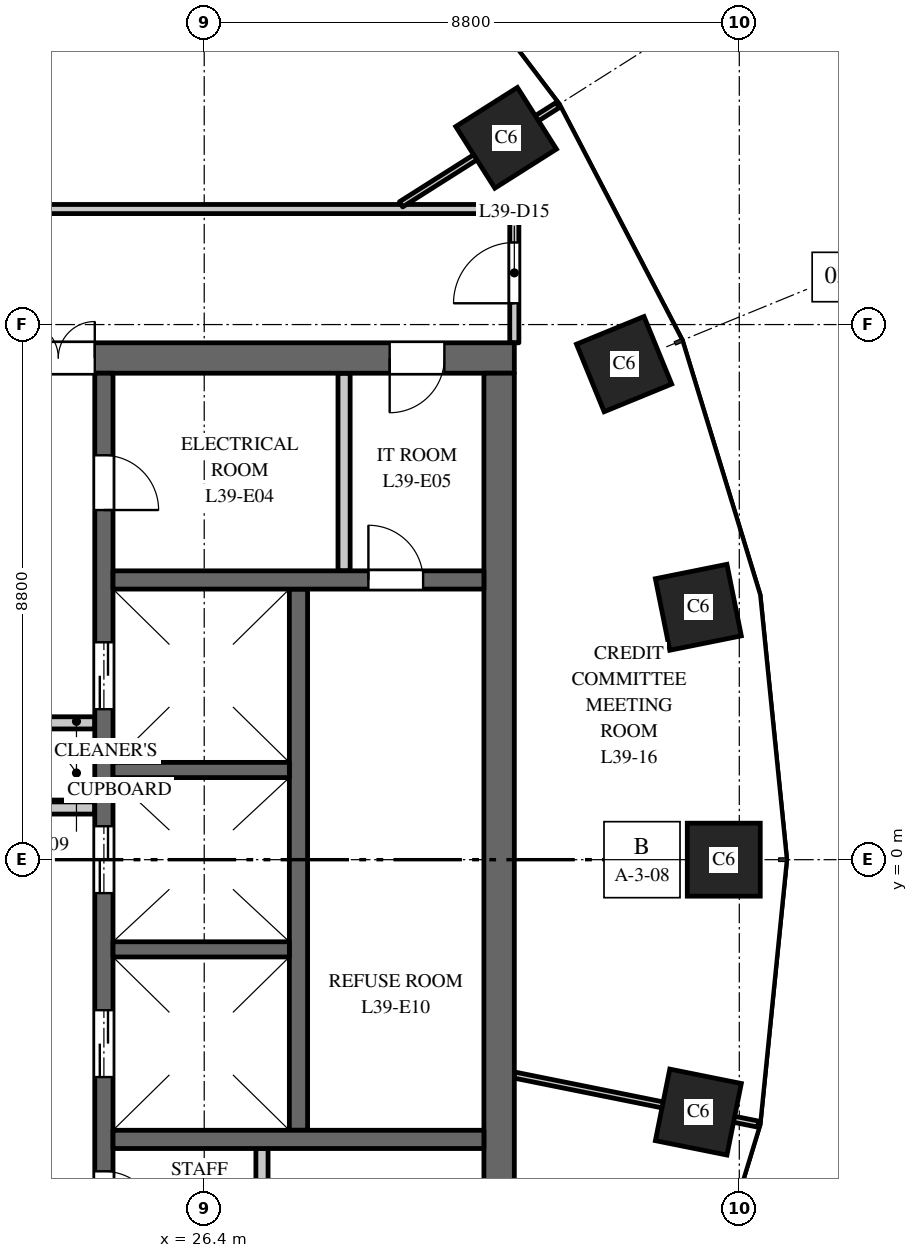
"""IFC4 building model, lengths in metres.
Left out: names, types, materials, properties, quantities, classifications, styles, units other than length and angle.
Written with IfcOpenShell. Run it as: python <this file> out.ifc"""

import sys

from ifc_helpers import new_model, si_unit, direction, frame, frame_2d, origin, origin_2d, place, context, subcontext, project, spatial, rectangle, extrude, element, fill, save


model = new_model("IFC4")
c1 = context("Model", 3, precision=1e-05, world=origin(), true_north=direction((0.0, 1.0)))
c2 = subcontext(c1, "Body", "Model", "MODEL_VIEW")
j1 = project(units=[si_unit("LENGTHUNIT", "METRE"), si_unit("PLANEANGLEUNIT", "RADIAN")], contexts=[c1])
p1 = place(None, origin())
s1 = spatial("IfcSite", under=j1, at=p1, CompositionType="ELEMENT")
p2 = place(p1, origin())
s2 = spatial("IfcBuilding", under=s1, at=p2, CompositionType="ELEMENT")
p3 = place(p2, frame((0.0, 0.0, 170.0)))
s3 = spatial("IfcBuildingStorey", under=s2, at=p3, CompositionType="ELEMENT", Elevation=170.0)
for number, where, z_axis, x_axis in (
    (1, (34.945, 0.0, 0.0), (0.0, 0.0, 1.0), (0.0, 1.0, 0.0)),
    (2, (34.527, 4.151, 0.0), (0.0, 0.0, 1.0), (-0.197, 0.98, 0.0)),
    (3, (33.305, 8.149, 0.0), (0.0, 0.0, 1.0), (-0.379, 0.925, 0.0)),
    (4, (31.365, 11.871, 0.0), (0.0, 0.0, 1.0), (-0.535, 0.845, 0.0)),
    (5, (34.527, -4.151, 0.0), (0.0, 0.0, 1.0), (0.197, 0.98, 0.0)),
):
    element("IfcColumn", number, at=place(p3, frame(where, z_axis=z_axis, x_axis=x_axis)), inside=s3, PredefinedType="COLUMN", context=c2, shape_type="SweptSolid", body=[
        extrude(rectangle(XDim=1.2, YDim=1.2, at=origin_2d()), origin(), (0.0, 0.0, 1.0), 4.0),
    ])
p4 = place(p3, frame((16.5, 8.25, 0.0), z_axis=(0.0, 0.0, 1.0), x_axis=(1.0, 0.0, 0.0)))
e6 = element("IfcWall", 6, at=p4, inside=s3, PredefinedType="SHEAR", context=c2, shape_type="SweptSolid", body=[
    extrude(rectangle(XDim=15.0, YDim=0.5, at=frame_2d((7.5, 0.0))), origin(), (0.0, 0.0, 1.0), 3.7),
])
p5 = place(p4, frame((6.9, 0.0, 0.0)))
e7 = element("IfcOpeningElement", 7, at=p5, cuts=e6, PredefinedType="OPENING", context=c2, shape_type="SweptSolid", body=[
    extrude(rectangle(XDim=1.2, YDim=2.1, at=frame_2d((0.6, 1.05))), frame((0.0, 0.26, 0.0), z_axis=(0.0, -1.0, 0.0), x_axis=(1.0, 0.0, 0.0)), (0.0, 0.0, 1.0), 0.52),
])
p6 = place(p4, frame((12.95, 0.0, 0.0)))
e8 = element("IfcOpeningElement", 8, at=p6, cuts=e6, PredefinedType="OPENING", context=c2, shape_type="SweptSolid", body=[
    extrude(rectangle(XDim=0.9, YDim=2.1, at=frame_2d((0.45, 1.05))), frame((0.0, 0.26, 0.0), z_axis=(0.0, -1.0, 0.0), x_axis=(1.0, 0.0, 0.0)), (0.0, 0.0, 1.0), 0.52),
])
p7 = place(p3, frame((27.95, -4.45, 0.0), z_axis=(0.0, 0.0, 1.0), x_axis=(0.0, 1.0, 0.0)))
e9 = element("IfcWall", 9, at=p7, inside=s3, PredefinedType="SHEAR", context=c2, shape_type="SweptSolid", body=[
    extrude(rectangle(XDim=8.9, YDim=0.3, at=frame_2d((4.45, 0.0))), origin(), (0.0, 0.0, 1.0), 3.7),
])
p8 = place(p3, frame((24.75, -8.0, 0.0), z_axis=(0.0, 0.0, 1.0), x_axis=(0.0, 1.0, 0.0)))
e10 = element("IfcWall", 10, at=p8, inside=s3, PredefinedType="SHEAR", context=c2, shape_type="SweptSolid", body=[
    extrude(rectangle(XDim=16.0, YDim=0.3, at=frame_2d((8.0, 0.0))), origin(), (0.0, 0.0, 1.0), 3.7),
])
p9 = place(p8, frame((4.425, 0.0, 0.0)))
e11 = element("IfcOpeningElement", 11, at=p9, cuts=e10, PredefinedType="OPENING", context=c2, shape_type="SweptSolid", body=[
    extrude(rectangle(XDim=1.1, YDim=2.1, at=frame_2d((0.55, 1.05))), frame((0.0, 0.16, 0.0), z_axis=(0.0, -1.0, 0.0), x_axis=(1.0, 0.0, 0.0)), (0.0, 0.0, 1.0), 0.32),
])
p10 = place(p8, frame((7.45, 0.0, 0.0)))
e12 = element("IfcOpeningElement", 12, at=p10, cuts=e10, PredefinedType="OPENING", context=c2, shape_type="SweptSolid", body=[
    extrude(rectangle(XDim=1.1, YDim=2.1, at=frame_2d((0.55, 1.05))), frame((0.0, 0.16, 0.0), z_axis=(0.0, -1.0, 0.0), x_axis=(1.0, 0.0, 0.0)), (0.0, 0.0, 1.0), 0.32),
])
p11 = place(p8, frame((10.475, 0.0, 0.0)))
e13 = element("IfcOpeningElement", 13, at=p11, cuts=e10, PredefinedType="OPENING", context=c2, shape_type="SweptSolid", body=[
    extrude(rectangle(XDim=1.1, YDim=2.1, at=frame_2d((0.55, 1.05))), frame((0.0, 0.16, 0.0), z_axis=(0.0, -1.0, 0.0), x_axis=(1.0, 0.0, 0.0)), (0.0, 0.0, 1.0), 0.32),
])
p12 = place(p8, frame((13.75, 0.0, 0.0)))
e14 = element("IfcOpeningElement", 14, at=p12, cuts=e10, PredefinedType="OPENING", context=c2, shape_type="SweptSolid", body=[
    extrude(rectangle(XDim=0.9, YDim=2.1, at=frame_2d((0.45, 1.05))), frame((0.0, 0.16, 0.0), z_axis=(0.0, -1.0, 0.0), x_axis=(1.0, 0.0, 0.0)), (0.0, 0.0, 1.0), 0.32),
])
p13 = place(p8, frame((1.975, 0.0, 0.0)))
e15 = element("IfcOpeningElement", 15, at=p13, cuts=e10, PredefinedType="OPENING", context=c2, shape_type="SweptSolid", body=[
    extrude(rectangle(XDim=0.9, YDim=2.1, at=frame_2d((0.45, 1.05))), frame((0.0, 0.16, 0.0), z_axis=(0.0, -1.0, 0.0), x_axis=(1.0, 0.0, 0.0)), (0.0, 0.0, 1.0), 0.32),
])
p14 = place(p8, frame((0.35, 0.0, 0.0)))
e16 = element("IfcOpeningElement", 16, at=p14, cuts=e10, PredefinedType="OPENING", context=c2, shape_type="SweptSolid", body=[
    extrude(rectangle(XDim=0.9, YDim=2.1, at=frame_2d((0.45, 1.05))), frame((0.0, 0.16, 0.0), z_axis=(0.0, -1.0, 0.0), x_axis=(1.0, 0.0, 0.0)), (0.0, 0.0, 1.0), 0.32),
])
for number, where, z_axis, x_axis in (
    (17, (23.4, 0.85, 0.0), (0.0, 0.0, 1.0), (1.0, 0.0, 0.0)),
    (18, (23.4, 2.25, 0.0), (0.0, 0.0, 1.0), (1.0, 0.0, 0.0)),
):
    element("IfcWall", number, at=place(p3, frame(where, z_axis=z_axis, x_axis=x_axis)), inside=s3, PredefinedType="PARTITIONING", context=c2, shape_type="SweptSolid", body=[
        extrude(rectangle(XDim=1.2, YDim=0.2, at=frame_2d((0.6, 0.0))), origin(), (0.0, 0.0, 1.0), 3.7),
    ])
p15 = place(p3, frame((31.25, -8.0, 0.0), z_axis=(0.0, 0.0, 1.0), x_axis=(0.0, 1.0, 0.0)))
e19 = element("IfcWall", 19, at=p15, inside=s3, PredefinedType="SHEAR", context=c2, shape_type="SweptSolid", body=[
    extrude(rectangle(XDim=16.0, YDim=0.5, at=frame_2d((8.0, 0.0))), origin(), (0.0, 0.0, 1.0), 3.7),
])
p16 = place(p3, frame((24.9, 4.6, 0.0), z_axis=(0.0, 0.0, 1.0), x_axis=(1.0, 0.0, 0.0)))
e20 = element("IfcWall", 20, at=p16, inside=s3, PredefinedType="SHEAR", context=c2, shape_type="SweptSolid", body=[
    extrude(rectangle(XDim=6.1, YDim=0.3, at=frame_2d((3.05, 0.0))), origin(), (0.0, 0.0, 1.0), 3.7),
])
p17 = place(p16, frame((4.2, 0.0, 0.0)))
e21 = element("IfcOpeningElement", 21, at=p17, cuts=e20, PredefinedType="OPENING", context=c2, shape_type="SweptSolid", body=[
    extrude(rectangle(XDim=0.9, YDim=2.1, at=frame_2d((0.45, 1.05))), frame((0.0, 0.16, 0.0), z_axis=(0.0, -1.0, 0.0), x_axis=(1.0, 0.0, 0.0)), (0.0, 0.0, 1.0), 0.32),
])
for number, where, z_axis, x_axis in (
    (22, (28.7, 4.75, 0.0), (0.0, 0.0, 1.0), (0.0, 1.0, 0.0)),
    (23, (27.35, -8.0, 0.0), (0.0, 0.0, 1.0), (0.0, 1.0, 0.0)),
):
    element("IfcWall", number, at=place(p3, frame(where, z_axis=z_axis, x_axis=x_axis)), inside=s3, PredefinedType="PARTITIONING", context=c2, shape_type="SweptSolid", body=[
        extrude(rectangle(XDim=3.25, YDim=0.2, at=frame_2d((1.625, 0.0))), origin(), (0.0, 0.0, 1.0), 3.7),
    ])
p18 = place(p3, frame((24.9, -4.6, 0.0), z_axis=(0.0, 0.0, 1.0), x_axis=(1.0, 0.0, 0.0)))
e24 = element("IfcWall", 24, at=p18, inside=s3, PredefinedType="SHEAR", context=c2, shape_type="SweptSolid", body=[
    extrude(rectangle(XDim=6.1, YDim=0.3, at=frame_2d((3.05, 0.0))), origin(), (0.0, 0.0, 1.0), 3.7),
])
for number, where, z_axis, x_axis in (
    (25, (24.9, -1.475, 0.0), (0.0, 0.0, 1.0), (1.0, 0.0, 0.0)),
    (26, (24.9, 1.475, 0.0), (0.0, 0.0, 1.0), (1.0, 0.0, 0.0)),
):
    element("IfcWall", number, at=place(p3, frame(where, z_axis=z_axis, x_axis=x_axis)), inside=s3, PredefinedType="SHEAR", context=c2, shape_type="SweptSolid", body=[
        extrude(rectangle(XDim=2.9, YDim=0.25, at=frame_2d((1.45, 0.0))), origin(), (0.0, 0.0, 1.0), 3.7),
    ])
p19 = place(p3, frame((16.5, 10.7, 0.0), z_axis=(0.0, 0.0, 1.0), x_axis=(1.0, 0.0, 0.0)))
e27 = element("IfcWall", 27, at=p19, inside=s3, PredefinedType="PARTITIONING", context=c2, shape_type="SweptSolid", body=[
    extrude(rectangle(XDim=15.0, YDim=0.15, at=frame_2d((7.5, 0.0))), origin(), (0.0, 0.0, 1.0), 2.75),
])
p20 = place(p19, frame((4.621, 0.0, 0.0)))
e28 = element("IfcOpeningElement", 28, at=p20, cuts=e27, PredefinedType="OPENING", context=c2, shape_type="SweptSolid", body=[
    extrude(rectangle(XDim=1.0, YDim=2.1, at=frame_2d((0.5, 1.05))), frame((0.0, 0.085, 0.0), z_axis=(0.0, -1.0, 0.0), x_axis=(1.0, 0.0, 0.0)), (0.0, 0.0, 1.0), 0.17),
])
p21 = place(p3, frame((29.637, 10.777, 0.0), z_axis=(0.0, 0.0, 1.0), x_axis=(0.844810627195, 0.535065420467, 0.0)))
e29 = element("IfcWall", 29, at=p21, inside=s3, PredefinedType="PARTITIONING", context=c2, shape_type="SweptSolid", body=[
    extrude(rectangle(XDim=3.048, YDim=0.1, at=frame_2d((1.524, 0.0))), origin(), (0.0, 0.0, 1.0), 2.9),
])
p22 = place(p3, frame((31.5, -3.542, 0.0), z_axis=(0.0, 0.0, 1.0), x_axis=(0.980357474535, -0.197228857227, 0.0)))
e30 = element("IfcWall", 30, at=p22, inside=s3, PredefinedType="PARTITIONING", context=c2, shape_type="SweptSolid", body=[
    extrude(rectangle(XDim=4.092, YDim=0.1, at=frame_2d((2.046, 0.0))), origin(), (0.0, 0.0, 1.0), 2.9),
])
p23 = place(p3, frame((31.5, 8.5, 0.0), z_axis=(0.0, 0.0, 1.0), x_axis=(0.0, 1.0, 0.0)))
e31 = element("IfcWall", 31, at=p23, inside=s3, PredefinedType="PARTITIONING", context=c2, shape_type="SweptSolid", body=[
    extrude(rectangle(XDim=2.2, YDim=0.15, at=frame_2d((1.1, 0.0))), origin(), (0.0, 0.0, 1.0), 2.9),
])
p24 = place(p23, frame((0.65, 0.0, 0.0)))
e32 = element("IfcOpeningElement", 32, at=p24, cuts=e31, PredefinedType="OPENING", context=c2, shape_type="SweptSolid", body=[
    extrude(rectangle(XDim=1.0, YDim=2.1, at=frame_2d((0.5, 1.05))), frame((0.0, 0.085, 0.0), z_axis=(0.0, -1.0, 0.0), x_axis=(1.0, 0.0, 0.0)), (0.0, 0.0, 1.0), 0.17),
])
p25 = place(p9, origin())
e33 = element("IfcDoor", 33, at=p25, inside=s3, OperationType="DOUBLE_DOOR_SLIDING", PredefinedType="DOOR", context=c2, shape_type="SweptSolid", body=[
    extrude(rectangle(XDim=1.1, YDim=2.1, at=frame_2d((0.55, 1.05))), frame((0.0, 0.025, 0.0), z_axis=(0.0, -1.0, 0.0), x_axis=(1.0, 0.0, 0.0)), (0.0, 0.0, 1.0), 0.05),
])
fill(e11, e33)
p26 = place(p10, origin())
e34 = element("IfcDoor", 34, at=p26, inside=s3, OperationType="DOUBLE_DOOR_SLIDING", PredefinedType="DOOR", context=c2, shape_type="SweptSolid", body=[
    extrude(rectangle(XDim=1.1, YDim=2.1, at=frame_2d((0.55, 1.05))), frame((0.0, 0.025, 0.0), z_axis=(0.0, -1.0, 0.0), x_axis=(1.0, 0.0, 0.0)), (0.0, 0.0, 1.0), 0.05),
])
fill(e12, e34)
p27 = place(p11, origin())
e35 = element("IfcDoor", 35, at=p27, inside=s3, OperationType="DOUBLE_DOOR_SLIDING", PredefinedType="DOOR", context=c2, shape_type="SweptSolid", body=[
    extrude(rectangle(XDim=1.1, YDim=2.1, at=frame_2d((0.55, 1.05))), frame((0.0, 0.025, 0.0), z_axis=(0.0, -1.0, 0.0), x_axis=(1.0, 0.0, 0.0)), (0.0, 0.0, 1.0), 0.05),
])
fill(e13, e35)
p28 = place(p5, origin())
e36 = element("IfcDoor", 36, at=p28, inside=s3, OperationType="DOUBLE_DOOR_DOUBLE_SWING", PredefinedType="DOOR", context=c2, shape_type="SweptSolid", body=[
    extrude(rectangle(XDim=1.2, YDim=2.1, at=frame_2d((0.6, 1.05))), frame((0.0, 0.025, 0.0), z_axis=(0.0, -1.0, 0.0), x_axis=(1.0, 0.0, 0.0)), (0.0, 0.0, 1.0), 0.05),
])
fill(e7, e36)
p29 = place(p12, origin())
e37 = element("IfcDoor", 37, at=p29, inside=s3, OperationType="SINGLE_SWING_LEFT", PredefinedType="DOOR", context=c2, shape_type="SweptSolid", body=[
    extrude(rectangle(XDim=0.9, YDim=2.1, at=frame_2d((0.45, 1.05))), frame((0.0, 0.025, 0.0), z_axis=(0.0, -1.0, 0.0), x_axis=(1.0, 0.0, 0.0)), (0.0, 0.0, 1.0), 0.05),
])
fill(e14, e37)
p30 = place(p6, origin())
e38 = element("IfcDoor", 38, at=p30, inside=s3, OperationType="SINGLE_SWING_LEFT", PredefinedType="DOOR", context=c2, shape_type="SweptSolid", body=[
    extrude(rectangle(XDim=0.9, YDim=2.1, at=frame_2d((0.45, 1.05))), frame((0.0, 0.025, 0.0), z_axis=(0.0, -1.0, 0.0), x_axis=(1.0, 0.0, 0.0)), (0.0, 0.0, 1.0), 0.05),
])
fill(e8, e38)
p31 = place(p13, origin())
e39 = element("IfcDoor", 39, at=p31, inside=s3, OperationType="SINGLE_SWING_LEFT", PredefinedType="DOOR", context=c2, shape_type="SweptSolid", body=[
    extrude(rectangle(XDim=0.9, YDim=2.1, at=frame_2d((0.45, 1.05))), frame((0.0, 0.025, 0.0), z_axis=(0.0, -1.0, 0.0), x_axis=(1.0, 0.0, 0.0)), (0.0, 0.0, 1.0), 0.05),
])
fill(e15, e39)
p32 = place(p17, origin())
e40 = element("IfcDoor", 40, at=p32, inside=s3, OperationType="SINGLE_SWING_RIGHT", PredefinedType="DOOR", context=c2, shape_type="SweptSolid", body=[
    extrude(rectangle(XDim=0.9, YDim=2.1, at=frame_2d((0.45, 1.05))), frame((0.0, 0.025, 0.0), z_axis=(0.0, -1.0, 0.0), x_axis=(1.0, 0.0, 0.0)), (0.0, 0.0, 1.0), 0.05),
])
fill(e21, e40)
p33 = place(p24, origin())
e41 = element("IfcDoor", 41, at=p33, inside=s3, OperationType="SINGLE_SWING_LEFT", PredefinedType="DOOR", context=c2, shape_type="SweptSolid", body=[
    extrude(rectangle(XDim=1.0, YDim=2.1, at=frame_2d((0.5, 1.05))), frame((0.0, 0.025, 0.0), z_axis=(0.0, -1.0, 0.0), x_axis=(1.0, 0.0, 0.0)), (0.0, 0.0, 1.0), 0.05),
])
fill(e32, e41)
save(model, sys.argv[1])
